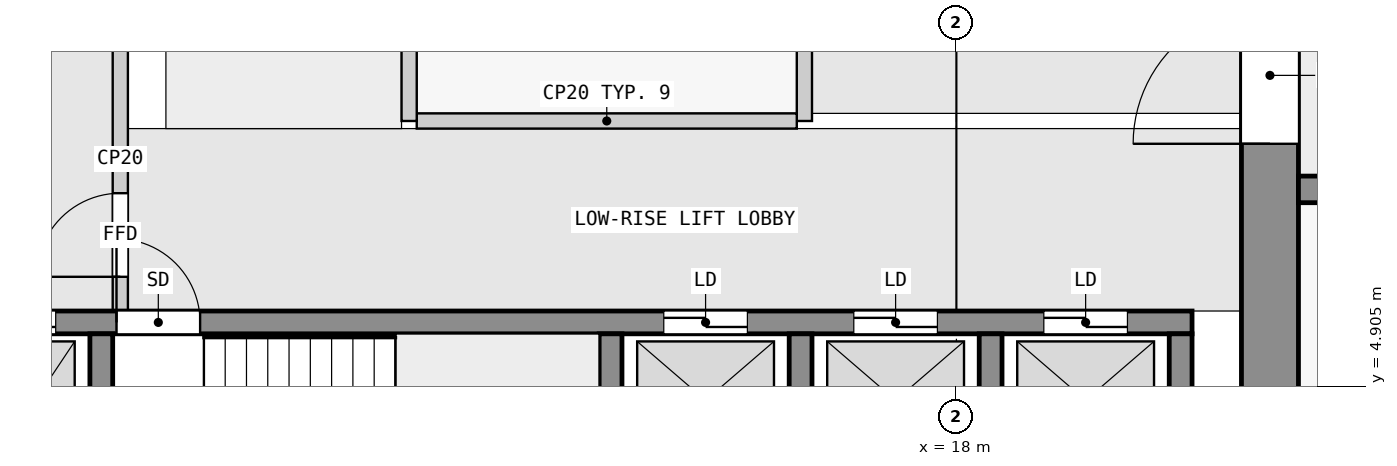
"""IFC4 building model, lengths in metres.
Left out: names, types, materials, properties, quantities, classifications, styles, units other than length and angle.
Written with IfcOpenShell. Run it as: python <this file> out.ifc"""

import sys

from ifc_helpers import new_model, si_unit, direction, frame, frame_2d, origin, place, context, subcontext, project, spatial, rectangle, extrude, element, fill, save


model = new_model("IFC4")
c1 = context("Model", 3, precision=1e-05, world=origin(), true_north=direction((0.0, 1.0)))
c2 = subcontext(c1, "Body", "Model", "MODEL_VIEW")
j1 = project(units=[si_unit("LENGTHUNIT", "METRE"), si_unit("PLANEANGLEUNIT", "RADIAN")], contexts=[c1])
p1 = place(None, origin())
s1 = spatial("IfcSite", under=j1, at=p1, CompositionType="ELEMENT")
p2 = place(p1, origin())
s2 = spatial("IfcBuilding", under=s1, at=p2, CompositionType="ELEMENT")
p3 = place(p2, frame((0.0, 0.0, 47.8)))
s3 = spatial("IfcBuildingStorey", under=s2, at=p3, CompositionType="ELEMENT", Elevation=47.8)
p4 = place(p3, frame((22.125, 2.5, 0.0), z_axis=(0.0, 0.0, 1.0), x_axis=(0.0, 1.0, 0.0)))
e1 = element("IfcWall", 1, at=p4, inside=s3, PredefinedType="SHEAR", context=c2, shape_type="SweptSolid", body=[
    extrude(rectangle(XDim=14.75, YDim=0.75, at=frame_2d((7.375, 0.0))), origin(), (0.0, 0.0, 1.0), 3.25),
])
p5 = place(p4, frame((5.6, 0.0, 0.0)))
e2 = element("IfcOpeningElement", 2, at=p5, cuts=e1, PredefinedType="OPENING", context=c2, shape_type="SweptSolid", body=[
    extrude(rectangle(XDim=1.8, YDim=2.1, at=frame_2d((0.9, 1.05))), frame((0.0, 0.385, 0.0), z_axis=(0.0, -1.0, 0.0), x_axis=(1.0, 0.0, 0.0)), (0.0, 0.0, 1.0), 0.77),
])
for number, where, z_axis, x_axis in (
    (3, (6.75, 2.8, 0.0), (0.0, 0.0, 1.0), (0.0, 1.0, 0.0)),
    (4, (13.45, 2.8, 0.0), (0.0, 0.0, 1.0), (0.0, 1.0, 0.0)),
    (5, (15.95, 2.8, 0.0), (0.0, 0.0, 1.0), (0.0, 1.0, 0.0)),
    (6, (18.45, 2.8, 0.0), (0.0, 0.0, 1.0), (0.0, 1.0, 0.0)),
    (7, (20.95, 2.8, 0.0), (0.0, 0.0, 1.0), (0.0, 1.0, 0.0)),
):
    element("IfcWall", number, at=place(p3, frame(where, z_axis=z_axis, x_axis=x_axis)), inside=s3, PredefinedType="SHEAR", context=c2, shape_type="SweptSolid", body=[
        extrude(rectangle(XDim=2.8, YDim=0.3, at=frame_2d((1.4, 0.0))), origin(), (0.0, 0.0, 1.0), 3.25),
    ])
p6 = place(p3, frame((2.3, 5.75, 0.0), z_axis=(0.0, 0.0, 1.0), x_axis=(1.0, 0.0, 0.0)))
e8 = element("IfcWall", 8, at=p6, inside=s3, PredefinedType="SHEAR", context=c2, shape_type="SweptSolid", body=[
    extrude(rectangle(XDim=18.8, YDim=0.3, at=frame_2d((9.4, 0.0))), origin(), (0.0, 0.0, 1.0), 3.25),
])
p7 = place(p6, frame((4.65, 0.0, 0.0)))
e9 = element("IfcOpeningElement", 9, at=p7, cuts=e8, PredefinedType="OPENING", context=c2, shape_type="SweptSolid", body=[
    extrude(rectangle(XDim=1.1, YDim=2.1, at=frame_2d((0.55, 1.05))), frame((0.0, 0.16, 0.0), z_axis=(0.0, -1.0, 0.0), x_axis=(1.0, 0.0, 0.0)), (0.0, 0.0, 1.0), 0.32),
])
p8 = place(p6, frame((0.45, 0.0, 0.0)))
e10 = element("IfcOpeningElement", 10, at=p8, cuts=e8, PredefinedType="OPENING", context=c2, shape_type="SweptSolid", body=[
    extrude(rectangle(XDim=1.1, YDim=2.1, at=frame_2d((0.55, 1.05))), frame((0.0, 0.16, 0.0), z_axis=(0.0, -1.0, 0.0), x_axis=(1.0, 0.0, 0.0)), (0.0, 0.0, 1.0), 0.32),
])
p9 = place(p6, frame((2.75, 0.0, 0.0)))
e11 = element("IfcOpeningElement", 11, at=p9, cuts=e8, PredefinedType="OPENING", context=c2, shape_type="SweptSolid", body=[
    extrude(rectangle(XDim=1.1, YDim=2.1, at=frame_2d((0.55, 1.05))), frame((0.0, 0.16, 0.0), z_axis=(0.0, -1.0, 0.0), x_axis=(1.0, 0.0, 0.0)), (0.0, 0.0, 1.0), 0.32),
])
p10 = place(p6, frame((11.85, 0.0, 0.0)))
e12 = element("IfcOpeningElement", 12, at=p10, cuts=e8, PredefinedType="OPENING", context=c2, shape_type="SweptSolid", body=[
    extrude(rectangle(XDim=1.1, YDim=2.1, at=frame_2d((0.55, 1.05))), frame((0.0, 0.16, 0.0), z_axis=(0.0, -1.0, 0.0), x_axis=(1.0, 0.0, 0.0)), (0.0, 0.0, 1.0), 0.32),
])
p11 = place(p6, frame((14.35, 0.0, 0.0)))
e13 = element("IfcOpeningElement", 13, at=p11, cuts=e8, PredefinedType="OPENING", context=c2, shape_type="SweptSolid", body=[
    extrude(rectangle(XDim=1.1, YDim=2.1, at=frame_2d((0.55, 1.05))), frame((0.0, 0.16, 0.0), z_axis=(0.0, -1.0, 0.0), x_axis=(1.0, 0.0, 0.0)), (0.0, 0.0, 1.0), 0.32),
])
p12 = place(p6, frame((16.85, 0.0, 0.0)))
e14 = element("IfcOpeningElement", 14, at=p12, cuts=e8, PredefinedType="OPENING", context=c2, shape_type="SweptSolid", body=[
    extrude(rectangle(XDim=1.1, YDim=2.1, at=frame_2d((0.55, 1.05))), frame((0.0, 0.16, 0.0), z_axis=(0.0, -1.0, 0.0), x_axis=(1.0, 0.0, 0.0)), (0.0, 0.0, 1.0), 0.32),
])
p13 = place(p3, frame((22.5, 7.5, 0.0), z_axis=(0.0, 0.0, 1.0), x_axis=(1.0, 0.0, 0.0)))
e15 = element("IfcWall", 15, at=p13, inside=s3, PredefinedType="SHEAR", context=c2, shape_type="SweptSolid", body=[
    extrude(rectangle(XDim=22.5, YDim=0.35, at=frame_2d((11.25, 0.0))), origin(), (0.0, 0.0, 1.0), 3.25),
])
p14 = place(p13, frame((1.75, 0.0, 0.0)))
e16 = element("IfcOpeningElement", 16, at=p14, cuts=e15, PredefinedType="OPENING", context=c2, shape_type="SweptSolid", body=[
    extrude(rectangle(XDim=1.0, YDim=2.1, at=frame_2d((0.5, 1.05))), frame((0.0, 0.185, 0.0), z_axis=(0.0, -1.0, 0.0), x_axis=(1.0, 0.0, 0.0)), (0.0, 0.0, 1.0), 0.37),
])
p15 = place(p13, frame((10.15, 0.0, 0.0)))
e17 = element("IfcOpeningElement", 17, at=p15, cuts=e15, PredefinedType="OPENING", context=c2, shape_type="SweptSolid", body=[
    extrude(rectangle(XDim=1.0, YDim=2.1, at=frame_2d((0.5, 1.05))), frame((0.0, 0.185, 0.0), z_axis=(0.0, -1.0, 0.0), x_axis=(1.0, 0.0, 0.0)), (0.0, 0.0, 1.0), 0.37),
])
p16 = place(p13, frame((18.75, 0.0, 0.0)))
e18 = element("IfcOpeningElement", 18, at=p16, cuts=e15, PredefinedType="OPENING", context=c2, shape_type="SweptSolid", body=[
    extrude(rectangle(XDim=0.9, YDim=2.1, at=frame_2d((0.45, 1.05))), frame((0.0, 0.185, 0.0), z_axis=(0.0, -1.0, 0.0), x_axis=(1.0, 0.0, 0.0)), (0.0, 0.0, 1.0), 0.37),
])
p17 = place(p13, frame((20.95, 0.0, 0.0)))
e19 = element("IfcOpeningElement", 19, at=p17, cuts=e15, PredefinedType="OPENING", context=c2, shape_type="SweptSolid", body=[
    extrude(rectangle(XDim=1.0, YDim=2.1, at=frame_2d((0.5, 1.05))), frame((0.0, 0.185, 0.0), z_axis=(0.0, -1.0, 0.0), x_axis=(1.0, 0.0, 0.0)), (0.0, 0.0, 1.0), 0.37),
])
p18 = place(p3, frame((7.0, 5.9, 0.0), z_axis=(0.0, 0.0, 1.0), x_axis=(0.0, 1.0, 0.0)))
e20 = element("IfcWall", 20, at=p18, inside=s3, PredefinedType="PARTITIONING", context=c2, shape_type="SweptSolid", body=[
    extrude(rectangle(XDim=4.0, YDim=0.2, at=frame_2d((2.0, 0.0))), origin(), (0.0, 0.0, 1.0), 3.25),
])
p19 = place(p18, frame((0.45, 0.0, 0.0)))
e21 = element("IfcOpeningElement", 21, at=p19, cuts=e20, PredefinedType="OPENING", context=c2, shape_type="SweptSolid", body=[
    extrude(rectangle(XDim=1.1, YDim=2.1, at=frame_2d((0.55, 1.05))), frame((0.0, 0.11, 0.0), z_axis=(0.0, -1.0, 0.0), x_axis=(1.0, 0.0, 0.0)), (0.0, 0.0, 1.0), 0.22),
])
p20 = place(p3, frame((10.8, 8.4, 0.0), z_axis=(0.0, 0.0, 1.0), x_axis=(0.0, 1.0, 0.0)))
e22 = element("IfcWall", 22, at=p20, inside=s3, PredefinedType="PARTITIONING", context=c2, shape_type="SweptSolid", body=[
    extrude(rectangle(XDim=6.2, YDim=0.2, at=frame_2d((3.1, 0.0))), origin(), (0.0, 0.0, 1.0), 3.25),
])
p21 = place(p3, frame((10.9, 8.4, 0.0), z_axis=(0.0, 0.0, 1.0), x_axis=(1.0, 0.0, 0.0)))
e23 = element("IfcWall", 23, at=p21, inside=s3, PredefinedType="PARTITIONING", context=c2, shape_type="SweptSolid", body=[
    extrude(rectangle(XDim=5.0, YDim=0.2, at=frame_2d((2.5, 0.0))), origin(), (0.0, 0.0, 1.0), 3.25),
])
p22 = place(p3, frame((16.0, 8.4, 0.0), z_axis=(0.0, 0.0, 1.0), x_axis=(0.0, 1.0, 0.0)))
e24 = element("IfcWall", 24, at=p22, inside=s3, PredefinedType="PARTITIONING", context=c2, shape_type="SweptSolid", body=[
    extrude(rectangle(XDim=6.2, YDim=0.2, at=frame_2d((3.1, 0.0))), origin(), (0.0, 0.0, 1.0), 3.25),
])
p23 = place(p22, frame((3.15, 0.0, 0.0)))
e25 = element("IfcOpeningElement", 25, at=p23, cuts=e24, PredefinedType="OPENING", context=c2, shape_type="SweptSolid", body=[
    extrude(rectangle(XDim=0.9, YDim=2.1, at=frame_2d((0.45, 1.05))), frame((0.0, 0.11, 0.0), z_axis=(0.0, -1.0, 0.0), x_axis=(1.0, 0.0, 0.0)), (0.0, 0.0, 1.0), 0.22),
])
p24 = place(p19, origin())
e26 = element("IfcDoor", 26, at=p24, inside=s3, OperationType="SINGLE_SWING_LEFT", PredefinedType="DOOR", context=c2, shape_type="SweptSolid", body=[
    extrude(rectangle(XDim=1.1, YDim=2.1, at=frame_2d((0.55, 1.05))), frame((0.0, 0.025, 0.0), z_axis=(0.0, -1.0, 0.0), x_axis=(1.0, 0.0, 0.0)), (0.0, 0.0, 1.0), 0.05),
])
fill(e21, e26)
p25 = place(p7, origin())
e27 = element("IfcDoor", 27, at=p25, inside=s3, OperationType="SINGLE_SWING_LEFT", PredefinedType="DOOR", context=c2, shape_type="SweptSolid", body=[
    extrude(rectangle(XDim=1.1, YDim=2.1, at=frame_2d((0.55, 1.05))), frame((0.0, 0.025, 0.0), z_axis=(0.0, -1.0, 0.0), x_axis=(1.0, 0.0, 0.0)), (0.0, 0.0, 1.0), 0.05),
])
fill(e9, e27)
p26 = place(p9, origin())
e28 = element("IfcDoor", 28, at=p26, inside=s3, OperationType="DOUBLE_DOOR_SLIDING", PredefinedType="DOOR", context=c2, shape_type="SweptSolid", body=[
    extrude(rectangle(XDim=1.1, YDim=2.1, at=frame_2d((0.55, 1.05))), frame((0.0, 0.025, 0.0), z_axis=(0.0, -1.0, 0.0), x_axis=(1.0, 0.0, 0.0)), (0.0, 0.0, 1.0), 0.05),
])
fill(e11, e28)
p27 = place(p10, origin())
e29 = element("IfcDoor", 29, at=p27, inside=s3, OperationType="DOUBLE_DOOR_SLIDING", PredefinedType="DOOR", context=c2, shape_type="SweptSolid", body=[
    extrude(rectangle(XDim=1.1, YDim=2.1, at=frame_2d((0.55, 1.05))), frame((0.0, 0.025, 0.0), z_axis=(0.0, -1.0, 0.0), x_axis=(1.0, 0.0, 0.0)), (0.0, 0.0, 1.0), 0.05),
])
fill(e12, e29)
p28 = place(p11, origin())
e30 = element("IfcDoor", 30, at=p28, inside=s3, OperationType="DOUBLE_DOOR_SLIDING", PredefinedType="DOOR", context=c2, shape_type="SweptSolid", body=[
    extrude(rectangle(XDim=1.1, YDim=2.1, at=frame_2d((0.55, 1.05))), frame((0.0, 0.025, 0.0), z_axis=(0.0, -1.0, 0.0), x_axis=(1.0, 0.0, 0.0)), (0.0, 0.0, 1.0), 0.05),
])
fill(e13, e30)
p29 = place(p12, origin())
e31 = element("IfcDoor", 31, at=p29, inside=s3, OperationType="DOUBLE_DOOR_SLIDING", PredefinedType="DOOR", context=c2, shape_type="SweptSolid", body=[
    extrude(rectangle(XDim=1.1, YDim=2.1, at=frame_2d((0.55, 1.05))), frame((0.0, 0.025, 0.0), z_axis=(0.0, -1.0, 0.0), x_axis=(1.0, 0.0, 0.0)), (0.0, 0.0, 1.0), 0.05),
])
fill(e14, e31)
p30 = place(p5, origin())
e32 = element("IfcDoor", 32, at=p30, inside=s3, OperationType="DOUBLE_DOOR_SINGLE_SWING", PredefinedType="DOOR", context=c2, shape_type="SweptSolid", body=[
    extrude(rectangle(XDim=1.8, YDim=2.1, at=frame_2d((0.9, 1.05))), frame((0.0, 0.025, 0.0), z_axis=(0.0, -1.0, 0.0), x_axis=(1.0, 0.0, 0.0)), (0.0, 0.0, 1.0), 0.05),
])
fill(e2, e32)
save(model, sys.argv[1])
